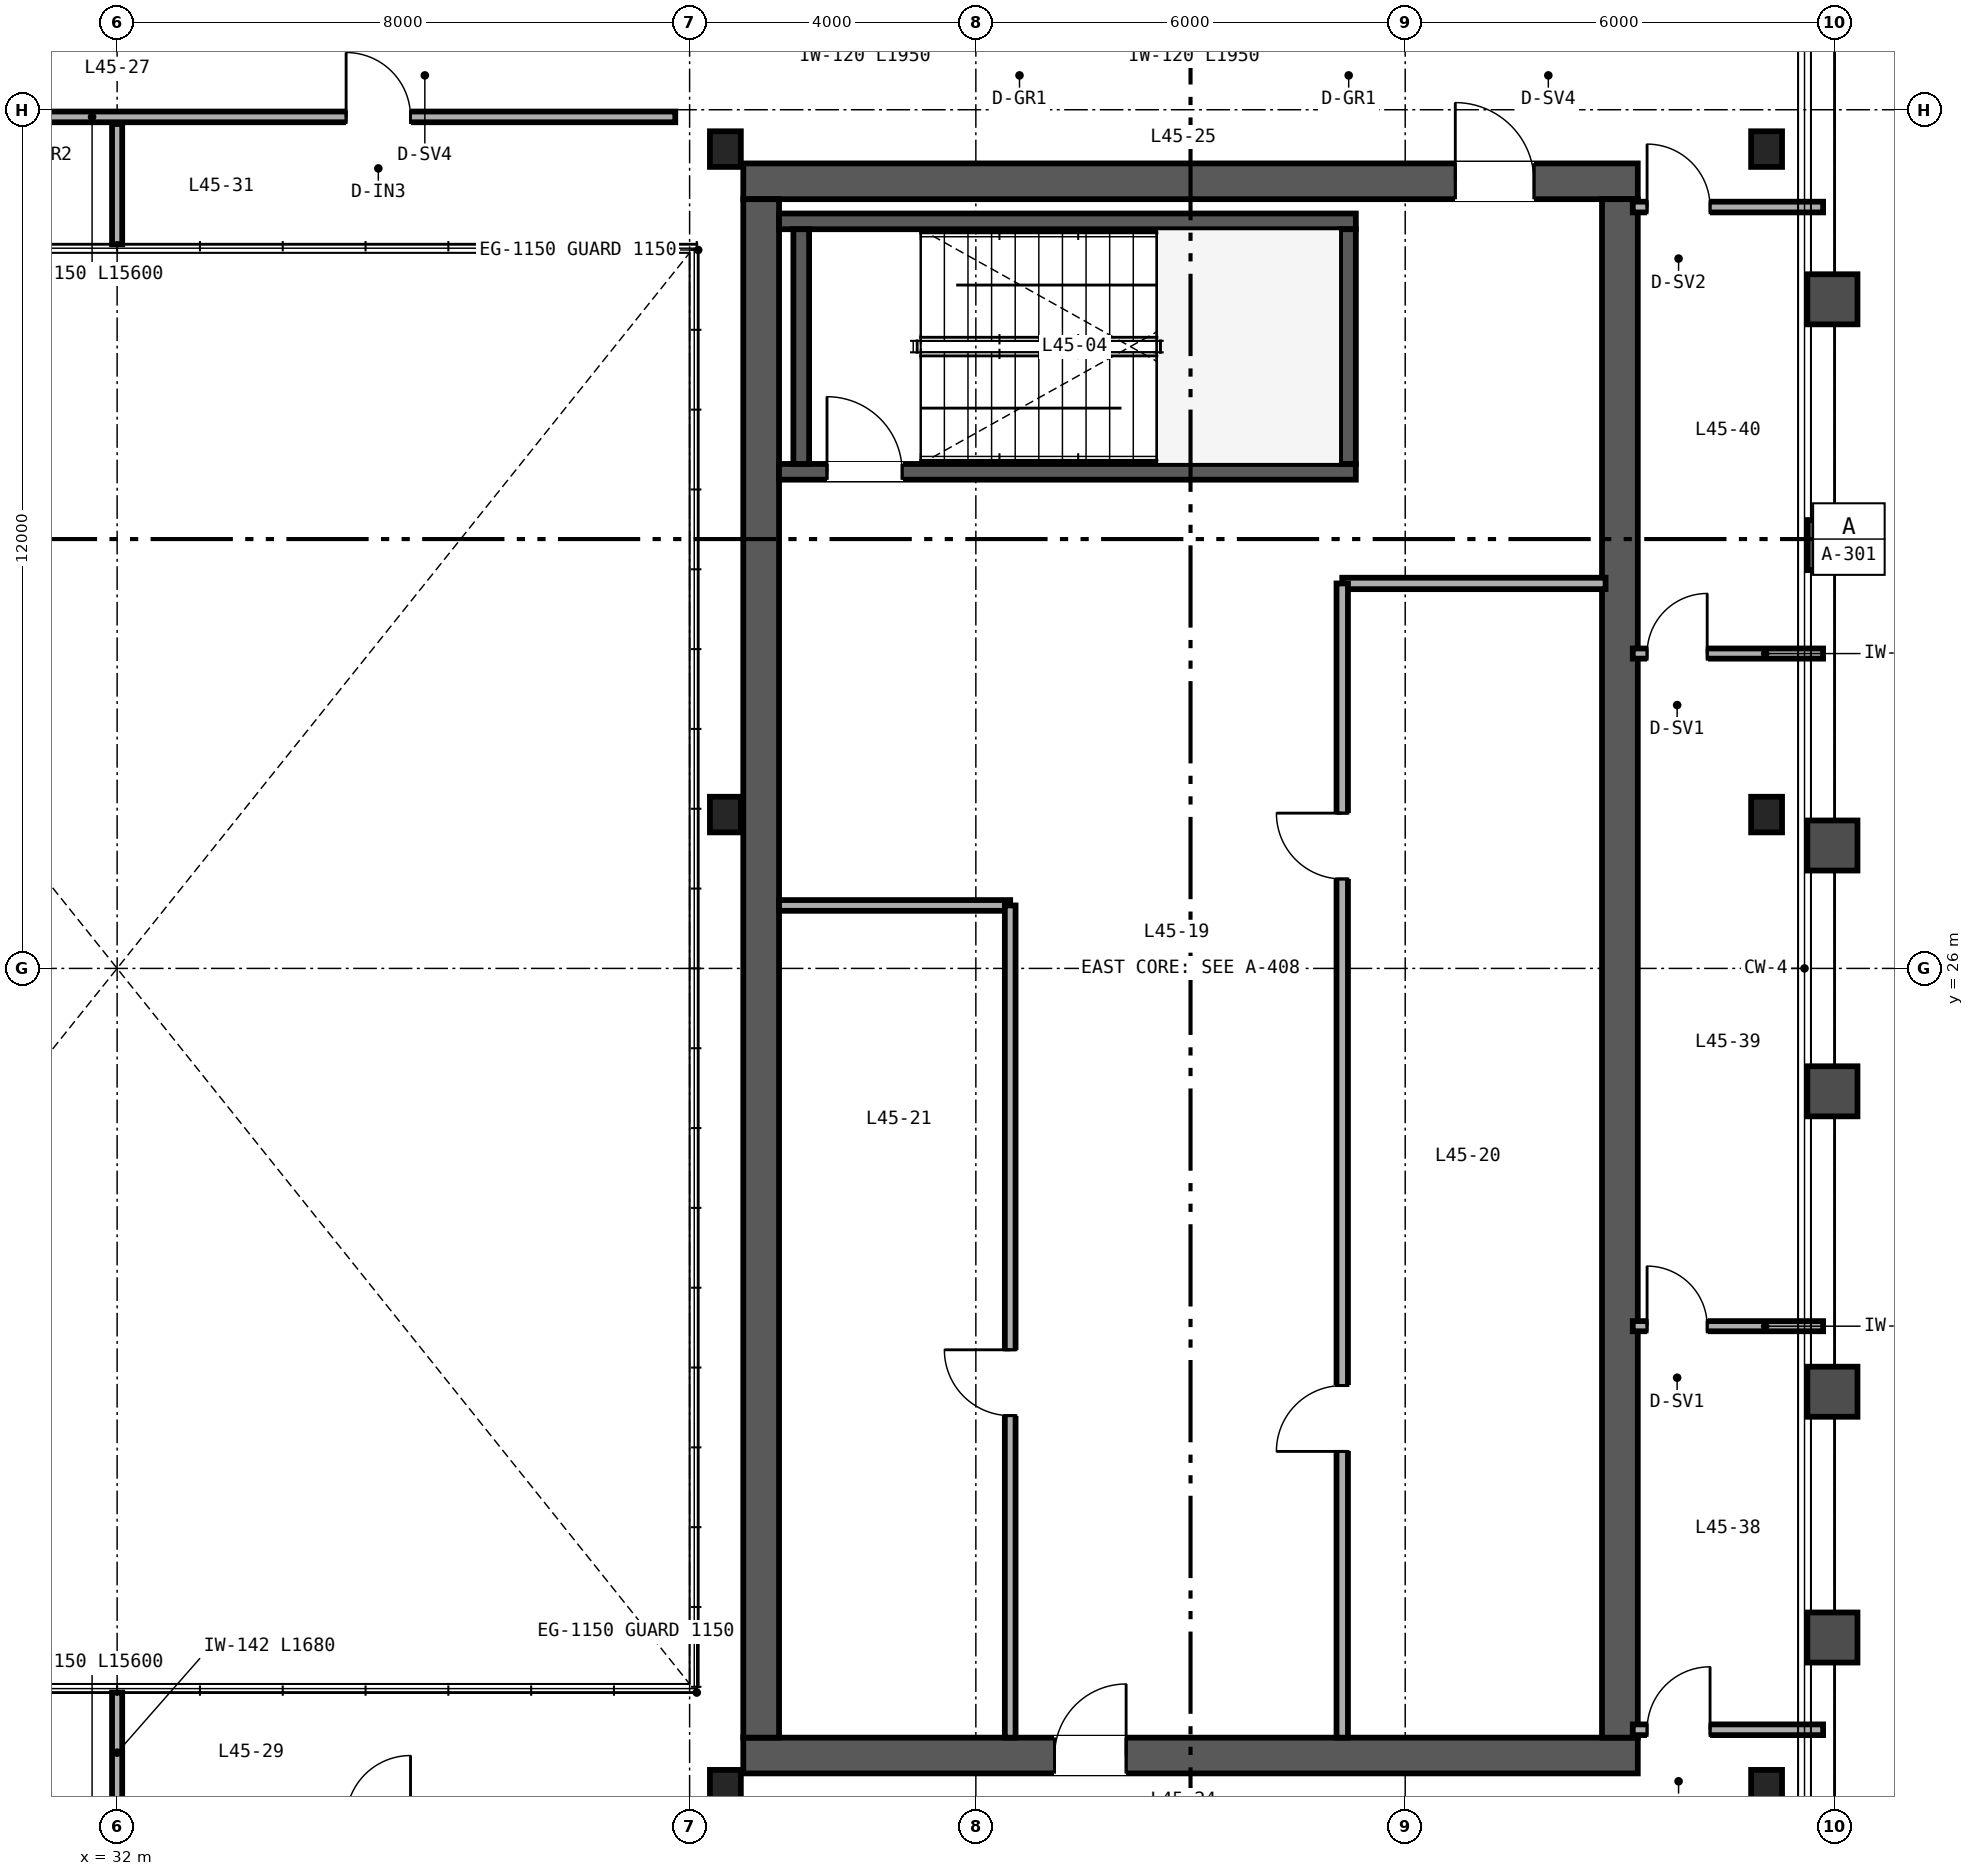
"""IFC4 building model, lengths in metres.
Left out: names, types, materials, properties, quantities, classifications, styles, units other than length and angle.
Written with IfcOpenShell. Run it as: python <this file> out.ifc"""

import sys

from ifc_helpers import new_model, si_unit, direction, frame, frame_2d, origin, origin_2d, place, context, subcontext, project, spatial, rectangle, i_section, extrude, source, transform, mapped, element, fill, save


model = new_model("IFC4")
c1 = context("Model", 3, precision=1e-05, world=origin(), true_north=direction((0.0, 1.0)))
c2 = subcontext(c1, "Body", "Model", "MODEL_VIEW")
j1 = project(units=[si_unit("LENGTHUNIT", "METRE"), si_unit("PLANEANGLEUNIT", "RADIAN")], contexts=[c1])
p1 = place(None, origin())
s1 = spatial("IfcSite", under=j1, at=p1, CompositionType="ELEMENT")
p2 = place(p1, origin())
s2 = spatial("IfcBuilding", under=s1, at=p2, CompositionType="ELEMENT")
p3 = place(p2, frame((0.0, 0.0, 181.2)))
s3 = spatial("IfcBuildingStorey", under=s2, at=p3, CompositionType="ELEMENT", Elevation=181.2)
p4 = place(p3, frame((40.75, 15.0, 0.0), z_axis=(0.0, 0.0, 1.0), x_axis=(1.0, 0.0, 0.0)))
e1 = element("IfcWall", 1, at=p4, inside=s3, PredefinedType="SHEAR", context=c2, shape_type="SweptSolid", body=[
    extrude(rectangle(XDim=12.5, YDim=0.5, at=frame_2d((6.25, 0.0))), origin(), (0.0, 0.0, 1.0), 3.37),
])
p5 = place(p4, frame((4.35, 0.0, 0.0)))
e2 = element("IfcOpeningElement", 2, at=p5, cuts=e1, PredefinedType="OPENING", context=c2, shape_type="SweptSolid", body=[
    extrude(rectangle(XDim=1.0, YDim=2.15, at=frame_2d((0.5, 1.075))), frame((0.0, 0.26, 0.0), z_axis=(0.0, -1.0, 0.0), x_axis=(1.0, 0.0, 0.0)), (0.0, 0.0, 1.0), 0.52),
])
p6 = place(p3, frame((40.75, 37.0, 0.0), z_axis=(0.0, 0.0, 1.0), x_axis=(1.0, 0.0, 0.0)))
e3 = element("IfcWall", 3, at=p6, inside=s3, PredefinedType="SHEAR", context=c2, shape_type="SweptSolid", body=[
    extrude(rectangle(XDim=12.5, YDim=0.5, at=frame_2d((6.25, 0.0))), origin(), (0.0, 0.0, 1.0), 3.37),
])
p7 = place(p6, frame((9.95, 0.0, 0.0)))
e4 = element("IfcOpeningElement", 4, at=p7, cuts=e3, PredefinedType="OPENING", context=c2, shape_type="SweptSolid", body=[
    extrude(rectangle(XDim=1.1, YDim=2.15, at=frame_2d((0.55, 1.075))), frame((0.0, 0.26, 0.0), z_axis=(0.0, -1.0, 0.0), x_axis=(1.0, 0.0, 0.0)), (0.0, 0.0, 1.0), 0.52),
])
for number, where, z_axis, x_axis in (
    (5, (41.0, 15.25, 0.0), (0.0, 0.0, 1.0), (0.0, 1.0, 0.0)),
    (6, (53.0, 15.25, 0.0), (0.0, 0.0, 1.0), (0.0, 1.0, 0.0)),
):
    element("IfcWall", number, at=place(p3, frame(where, z_axis=z_axis, x_axis=x_axis)), inside=s3, PredefinedType="SHEAR", context=c2, shape_type="SweptSolid", body=[
        extrude(rectangle(XDim=21.5, YDim=0.5, at=frame_2d((10.75, 0.0))), origin(), (0.0, 0.0, 1.0), 3.37),
    ])
p8 = place(p3, frame((41.25, 32.94, 0.0), z_axis=(0.0, 0.0, 1.0), x_axis=(1.0, 0.0, 0.0)))
e7 = element("IfcWall", 7, at=p8, inside=s3, PredefinedType="SHEAR", context=c2, shape_type="SweptSolid", body=[
    extrude(rectangle(XDim=8.06, YDim=0.22, at=frame_2d((4.03, 0.0))), origin(), (0.0, 0.0, 1.0), 3.4),
])
p9 = place(p8, frame((0.67, 0.0, 0.0)))
e8 = element("IfcOpeningElement", 8, at=p9, cuts=e7, PredefinedType="OPENING", context=c2, shape_type="SweptSolid", body=[
    extrude(rectangle(XDim=1.05, YDim=2.15, at=frame_2d((0.525, 1.075))), frame((0.0, 0.12, 0.0), z_axis=(0.0, -1.0, 0.0), x_axis=(1.0, 0.0, 0.0)), (0.0, 0.0, 1.0), 0.24),
])
p10 = place(p3, frame((41.25, 36.44, 0.0), z_axis=(0.0, 0.0, 1.0), x_axis=(1.0, 0.0, 0.0)))
e9 = element("IfcWall", 9, at=p10, inside=s3, PredefinedType="SHEAR", context=c2, shape_type="SweptSolid", body=[
    extrude(rectangle(XDim=8.06, YDim=0.22, at=frame_2d((4.03, 0.0))), origin(), (0.0, 0.0, 1.0), 3.4),
])
for number, where, z_axis, x_axis in (
    (10, (41.56, 33.05, 0.0), (0.0, 0.0, 1.0), (0.0, 1.0, 0.0)),
    (11, (49.2, 33.05, 0.0), (0.0, 0.0, 1.0), (0.0, 1.0, 0.0)),
):
    element("IfcWall", number, at=place(p3, frame(where, z_axis=z_axis, x_axis=x_axis)), inside=s3, PredefinedType="SHEAR", context=c2, shape_type="SweptSolid", body=[
        extrude(rectangle(XDim=3.28, YDim=0.22, at=frame_2d((1.64, 0.0))), origin(), (0.0, 0.0, 1.0), 3.4),
    ])
m1 = source(origin(), c2, "Body", "SweptSolid", [
    extrude(i_section(OverallWidth=0.432, OverallDepth=0.498, WebThickness=0.056, FlangeThickness=0.089, FilletRadius=0.025, at=origin_2d()), origin(), (0.0, 0.0, 1.0), 3.37),
])
for number, where, z_axis, x_axis in (
    (12, (40.5, 14.55, 0.0), (0.0, 0.0, 1.0), (1.0, 0.0, 0.0)),
    (13, (55.05, 14.55, 0.0), (0.0, 0.0, 1.0), (1.0, 0.0, 0.0)),
    (14, (40.5, 28.15, 0.0), (0.0, 0.0, 1.0), (1.0, 0.0, 0.0)),
    (15, (55.05, 28.15, 0.0), (0.0, 0.0, 1.0), (1.0, 0.0, 0.0)),
    (16, (40.5, 37.45, 0.0), (0.0, 0.0, 1.0), (1.0, 0.0, 0.0)),
    (17, (55.05, 37.45, 0.0), (0.0, 0.0, 1.0), (1.0, 0.0, 0.0)),
):
    element("IfcColumn", number, at=place(p3, frame(where, z_axis=z_axis, x_axis=x_axis)), inside=s3, PredefinedType="COLUMN", context=c2, shape_type="MappedRepresentation", body=[
        mapped(m1, transform((0.0, 0.0, 0.0), scale=1.0)),
    ])
p11 = place(p3, frame((49.12, 31.38, 0.0), z_axis=(0.0, 0.0, 1.0), x_axis=(1.0, 0.0, 0.0)))
e18 = element("IfcWall", 18, at=p11, inside=s3, PredefinedType="PARTITIONING", context=c2, shape_type="SweptSolid", body=[
    extrude(rectangle(XDim=3.68, YDim=0.16, at=frame_2d((1.84, 0.0))), origin(), (0.0, 0.0, 1.0), 2.47),
])
p12 = place(p3, frame((49.12, 15.25, 0.0), z_axis=(0.0, 0.0, 1.0), x_axis=(0.0, 1.0, 0.0)))
e19 = element("IfcWall", 19, at=p12, inside=s3, PredefinedType="PARTITIONING", context=c2, shape_type="SweptSolid", body=[
    extrude(rectangle(XDim=16.13, YDim=0.16, at=frame_2d((8.065, 0.0))), origin(), (0.0, 0.0, 1.0), 2.443),
])
p13 = place(p12, frame((4.0, 0.0, 0.0)))
e20 = element("IfcOpeningElement", 20, at=p13, cuts=e19, PredefinedType="OPENING", context=c2, shape_type="SweptSolid", body=[
    extrude(rectangle(XDim=0.92, YDim=2.15, at=frame_2d((0.46, 1.075))), frame((0.0, 0.09, 0.0), z_axis=(0.0, -1.0, 0.0), x_axis=(1.0, 0.0, 0.0)), (0.0, 0.0, 1.0), 0.18),
])
p14 = place(p12, frame((12.0, 0.0, 0.0)))
e21 = element("IfcOpeningElement", 21, at=p14, cuts=e19, PredefinedType="OPENING", context=c2, shape_type="SweptSolid", body=[
    extrude(rectangle(XDim=0.92, YDim=2.15, at=frame_2d((0.46, 1.075))), frame((0.0, 0.09, 0.0), z_axis=(0.0, -1.0, 0.0), x_axis=(1.0, 0.0, 0.0)), (0.0, 0.0, 1.0), 0.18),
])
p15 = place(p3, frame((41.25, 26.88, 0.0), z_axis=(0.0, 0.0, 1.0), x_axis=(1.0, 0.0, 0.0)))
e22 = element("IfcWall", 22, at=p15, inside=s3, PredefinedType="PARTITIONING", context=c2, shape_type="SweptSolid", body=[
    extrude(rectangle(XDim=3.23, YDim=0.15, at=frame_2d((1.615, 0.0))), origin(), (0.0, 0.0, 1.0), 3.37),
])
p16 = place(p3, frame((44.48, 15.25, 0.0), z_axis=(0.0, 0.0, 1.0), x_axis=(0.0, 1.0, 0.0)))
e23 = element("IfcWall", 23, at=p16, inside=s3, PredefinedType="PARTITIONING", context=c2, shape_type="SweptSolid", body=[
    extrude(rectangle(XDim=11.63, YDim=0.15, at=frame_2d((5.815, 0.0))), origin(), (0.0, 0.0, 1.0), 3.37),
])
p17 = place(p16, frame((4.5, 0.0, 0.0)))
e24 = element("IfcOpeningElement", 24, at=p17, cuts=e23, PredefinedType="OPENING", context=c2, shape_type="SweptSolid", body=[
    extrude(rectangle(XDim=0.92, YDim=2.15, at=frame_2d((0.46, 1.075))), frame((0.0, 0.085, 0.0), z_axis=(0.0, -1.0, 0.0), x_axis=(1.0, 0.0, 0.0)), (0.0, 0.0, 1.0), 0.17),
])
p18 = place(p3, frame((24.2, 37.9, 0.0), z_axis=(0.0, 0.0, 1.0), x_axis=(1.0, 0.0, 0.0)))
e25 = element("IfcWall", 25, at=p18, inside=s3, PredefinedType="PARTITIONING", context=c2, shape_type="SweptSolid", body=[
    extrude(rectangle(XDim=15.6, YDim=0.15, at=frame_2d((7.8, 0.0))), origin(), (0.0, 0.0, 1.0), 3.37),
])
p19 = place(p18, frame((3.0, 0.0, 0.0)))
e26 = element("IfcOpeningElement", 26, at=p19, cuts=e25, PredefinedType="OPENING", context=c2, shape_type="SweptSolid", body=[
    extrude(rectangle(XDim=0.9, YDim=2.15, at=frame_2d((0.45, 1.075))), frame((0.0, 0.085, 0.0), z_axis=(0.0, -1.0, 0.0), x_axis=(1.0, 0.0, 0.0)), (0.0, 0.0, 1.0), 0.17),
])
p20 = place(p18, frame((11.0, 0.0, 0.0)))
e27 = element("IfcOpeningElement", 27, at=p20, cuts=e25, PredefinedType="OPENING", context=c2, shape_type="SweptSolid", body=[
    extrude(rectangle(XDim=0.9, YDim=2.15, at=frame_2d((0.45, 1.075))), frame((0.0, 0.085, 0.0), z_axis=(0.0, -1.0, 0.0), x_axis=(1.0, 0.0, 0.0)), (0.0, 0.0, 1.0), 0.17),
])
for number, where, z_axis, x_axis in (
    (28, (32.0, 14.2, 0.0), (0.0, 0.0, 1.0), (0.0, 1.0, 0.0)),
    (29, (32.0, 36.12, 0.0), (0.0, 0.0, 1.0), (0.0, 1.0, 0.0)),
):
    element("IfcWall", number, at=place(p3, frame(where, z_axis=z_axis, x_axis=x_axis)), inside=s3, PredefinedType="PARTITIONING", context=c2, shape_type="SweptSolid", body=[
        extrude(rectangle(XDim=1.68, YDim=0.142, at=frame_2d((0.84, 0.0))), origin(), (0.0, 0.0, 1.0), 3.37),
    ])
p21 = place(p3, frame((53.18, 15.36, 0.0), z_axis=(0.0, 0.0, 1.0), x_axis=(1.0, 0.0, 0.0)))
e30 = element("IfcWall", 30, at=p21, inside=s3, PredefinedType="PARTITIONING", context=c2, shape_type="SweptSolid", body=[
    extrude(rectangle(XDim=2.66, YDim=0.15, at=frame_2d((1.33, 0.0))), origin(), (0.0, 0.0, 1.0), 2.591),
])
p22 = place(p21, frame((0.2, 0.0, 0.0)))
e31 = element("IfcOpeningElement", 31, at=p22, cuts=e30, PredefinedType="OPENING", context=c2, shape_type="SweptSolid", body=[
    extrude(rectangle(XDim=0.88, YDim=2.15, at=frame_2d((0.44, 1.075))), frame((0.0, 0.085, 0.0), z_axis=(0.0, -1.0, 0.0), x_axis=(1.0, 0.0, 0.0)), (0.0, 0.0, 1.0), 0.17),
])
p23 = place(p3, frame((53.18, 36.64, 0.0), z_axis=(0.0, 0.0, 1.0), x_axis=(1.0, 0.0, 0.0)))
e32 = element("IfcWall", 32, at=p23, inside=s3, PredefinedType="PARTITIONING", context=c2, shape_type="SweptSolid", body=[
    extrude(rectangle(XDim=2.66, YDim=0.15, at=frame_2d((1.33, 0.0))), origin(), (0.0, 0.0, 1.0), 2.753),
])
p24 = place(p23, frame((0.2, 0.0, 0.0)))
e33 = element("IfcOpeningElement", 33, at=p24, cuts=e32, PredefinedType="OPENING", context=c2, shape_type="SweptSolid", body=[
    extrude(rectangle(XDim=0.88, YDim=2.15, at=frame_2d((0.44, 1.075))), frame((0.0, 0.085, 0.0), z_axis=(0.0, -1.0, 0.0), x_axis=(1.0, 0.0, 0.0)), (0.0, 0.0, 1.0), 0.17),
])
p25 = place(p3, frame((53.18, 21.0, 0.0), z_axis=(0.0, 0.0, 1.0), x_axis=(1.0, 0.0, 0.0)))
e34 = element("IfcWall", 34, at=p25, inside=s3, PredefinedType="PARTITIONING", context=c2, shape_type="SweptSolid", body=[
    extrude(rectangle(XDim=2.66, YDim=0.142, at=frame_2d((1.33, 0.0))), origin(), (0.0, 0.0, 1.0), 2.591),
])
p26 = place(p25, frame((0.2, 0.0, 0.0)))
e35 = element("IfcOpeningElement", 35, at=p26, cuts=e34, PredefinedType="OPENING", context=c2, shape_type="SweptSolid", body=[
    extrude(rectangle(XDim=0.84, YDim=2.1, at=frame_2d((0.42, 1.05))), frame((0.0, 0.081, 0.0), z_axis=(0.0, -1.0, 0.0), x_axis=(1.0, 0.0, 0.0)), (0.0, 0.0, 1.0), 0.162),
])
p27 = place(p3, frame((53.18, 30.4, 0.0), z_axis=(0.0, 0.0, 1.0), x_axis=(1.0, 0.0, 0.0)))
e36 = element("IfcWall", 36, at=p27, inside=s3, PredefinedType="PARTITIONING", context=c2, shape_type="SweptSolid", body=[
    extrude(rectangle(XDim=2.66, YDim=0.142, at=frame_2d((1.33, 0.0))), origin(), (0.0, 0.0, 1.0), 2.753),
])
p28 = place(p27, frame((0.2, 0.0, 0.0)))
e37 = element("IfcOpeningElement", 37, at=p28, cuts=e36, PredefinedType="OPENING", context=c2, shape_type="SweptSolid", body=[
    extrude(rectangle(XDim=0.84, YDim=2.1, at=frame_2d((0.42, 1.05))), frame((0.0, 0.081, 0.0), z_axis=(0.0, -1.0, 0.0), x_axis=(1.0, 0.0, 0.0)), (0.0, 0.0, 1.0), 0.162),
])
m2 = source(origin(), c2, "Body", "SweptSolid", [
    extrude(rectangle(XDim=1.05, YDim=2.15, at=frame_2d((0.525, 1.075))), frame((0.0, 0.025, 0.0), z_axis=(0.0, -1.0, 0.0), x_axis=(1.0, 0.0, 0.0)), (0.0, 0.0, 1.0), 0.05),
])
p29 = place(p9, origin())
e38 = element("IfcDoor", 38, at=p29, inside=s3, OperationType="SINGLE_SWING_LEFT", PredefinedType="DOOR", context=c2, shape_type="MappedRepresentation", body=[
    mapped(m2, transform((0.0, 0.0, 0.0), scale=1.0)),
])
fill(e8, e38)
m3 = source(origin(), c2, "Body", "SweptSolid", [
    extrude(rectangle(XDim=1.0, YDim=2.15, at=frame_2d((0.5, 1.075))), frame((0.0, 0.025, 0.0), z_axis=(0.0, -1.0, 0.0), x_axis=(1.0, 0.0, 0.0)), (0.0, 0.0, 1.0), 0.05),
])
p30 = place(p5, origin())
e39 = element("IfcDoor", 39, at=p30, inside=s3, OperationType="SINGLE_SWING_RIGHT", PredefinedType="DOOR", context=c2, shape_type="MappedRepresentation", body=[
    mapped(m3, transform((0.0, 0.0, 0.0), scale=1.0)),
])
fill(e2, e39)
m4 = source(origin(), c2, "Body", "SweptSolid", [
    extrude(rectangle(XDim=1.1, YDim=2.15, at=frame_2d((0.55, 1.075))), frame((0.0, 0.025, 0.0), z_axis=(0.0, -1.0, 0.0), x_axis=(1.0, 0.0, 0.0)), (0.0, 0.0, 1.0), 0.05),
])
p31 = place(p7, origin())
e40 = element("IfcDoor", 40, at=p31, inside=s3, OperationType="SINGLE_SWING_LEFT", PredefinedType="DOOR", context=c2, shape_type="MappedRepresentation", body=[
    mapped(m4, transform((0.0, 0.0, 0.0), scale=1.0)),
])
fill(e4, e40)
m5 = source(origin(), c2, "Body", "SweptSolid", [
    extrude(rectangle(XDim=0.92, YDim=2.15, at=frame_2d((0.46, 1.075))), frame((0.0, 0.025, 0.0), z_axis=(0.0, -1.0, 0.0), x_axis=(1.0, 0.0, 0.0)), (0.0, 0.0, 1.0), 0.05),
])
p32 = place(p13, origin())
e41 = element("IfcDoor", 41, at=p32, inside=s3, OperationType="SINGLE_SWING_LEFT", PredefinedType="DOOR", context=c2, shape_type="MappedRepresentation", body=[
    mapped(m5, transform((0.0, 0.0, 0.0), scale=1.0)),
])
fill(e20, e41)
p33 = place(p14, origin())
e42 = element("IfcDoor", 42, at=p33, inside=s3, OperationType="SINGLE_SWING_RIGHT", PredefinedType="DOOR", context=c2, shape_type="MappedRepresentation", body=[
    mapped(m5, transform((0.0, 0.0, 0.0), scale=1.0)),
])
fill(e21, e42)
p34 = place(p17, origin())
e43 = element("IfcDoor", 43, at=p34, inside=s3, OperationType="SINGLE_SWING_RIGHT", PredefinedType="DOOR", context=c2, shape_type="MappedRepresentation", body=[
    mapped(m5, transform((0.0, 0.0, 0.0), scale=1.0)),
])
fill(e24, e43)
m6 = source(origin(), c2, "Body", "SweptSolid", [
    extrude(rectangle(XDim=0.9, YDim=2.15, at=frame_2d((0.45, 1.075))), frame((0.0, 0.025, 0.0), z_axis=(0.0, -1.0, 0.0), x_axis=(1.0, 0.0, 0.0)), (0.0, 0.0, 1.0), 0.05),
])
p35 = place(p20, origin())
e44 = element("IfcDoor", 44, at=p35, inside=s3, OperationType="SINGLE_SWING_LEFT", PredefinedType="DOOR", context=c2, shape_type="MappedRepresentation", body=[
    mapped(m6, transform((0.0, 0.0, 0.0), scale=1.0)),
])
fill(e27, e44)
m7 = source(origin(), c2, "Body", "SweptSolid", [
    extrude(rectangle(XDim=0.88, YDim=2.15, at=frame_2d((0.44, 1.075))), frame((0.0, 0.025, 0.0), z_axis=(0.0, -1.0, 0.0), x_axis=(1.0, 0.0, 0.0)), (0.0, 0.0, 1.0), 0.05),
])
p36 = place(p22, origin())
e45 = element("IfcDoor", 45, at=p36, inside=s3, OperationType="SINGLE_SWING_RIGHT", PredefinedType="DOOR", context=c2, shape_type="MappedRepresentation", body=[
    mapped(m7, transform((0.0, 0.0, 0.0), scale=1.0)),
])
fill(e31, e45)
p37 = place(p24, origin())
e46 = element("IfcDoor", 46, at=p37, inside=s3, OperationType="SINGLE_SWING_LEFT", PredefinedType="DOOR", context=c2, shape_type="MappedRepresentation", body=[
    mapped(m7, transform((0.0, 0.0, 0.0), scale=1.0)),
])
fill(e33, e46)
m8 = source(origin(), c2, "Body", "SweptSolid", [
    extrude(rectangle(XDim=0.84, YDim=2.1, at=frame_2d((0.42, 1.05))), frame((0.0, 0.025, 0.0), z_axis=(0.0, -1.0, 0.0), x_axis=(1.0, 0.0, 0.0)), (0.0, 0.0, 1.0), 0.05),
])
p38 = place(p26, origin())
e47 = element("IfcDoor", 47, at=p38, inside=s3, OperationType="SINGLE_SWING_LEFT", PredefinedType="DOOR", context=c2, shape_type="MappedRepresentation", body=[
    mapped(m8, transform((0.0, 0.0, 0.0), scale=1.0)),
])
fill(e35, e47)
p39 = place(p28, origin())
e48 = element("IfcDoor", 48, at=p39, inside=s3, OperationType="SINGLE_SWING_RIGHT", PredefinedType="DOOR", context=c2, shape_type="MappedRepresentation", body=[
    mapped(m8, transform((0.0, 0.0, 0.0), scale=1.0)),
])
fill(e37, e48)
save(model, sys.argv[1])
